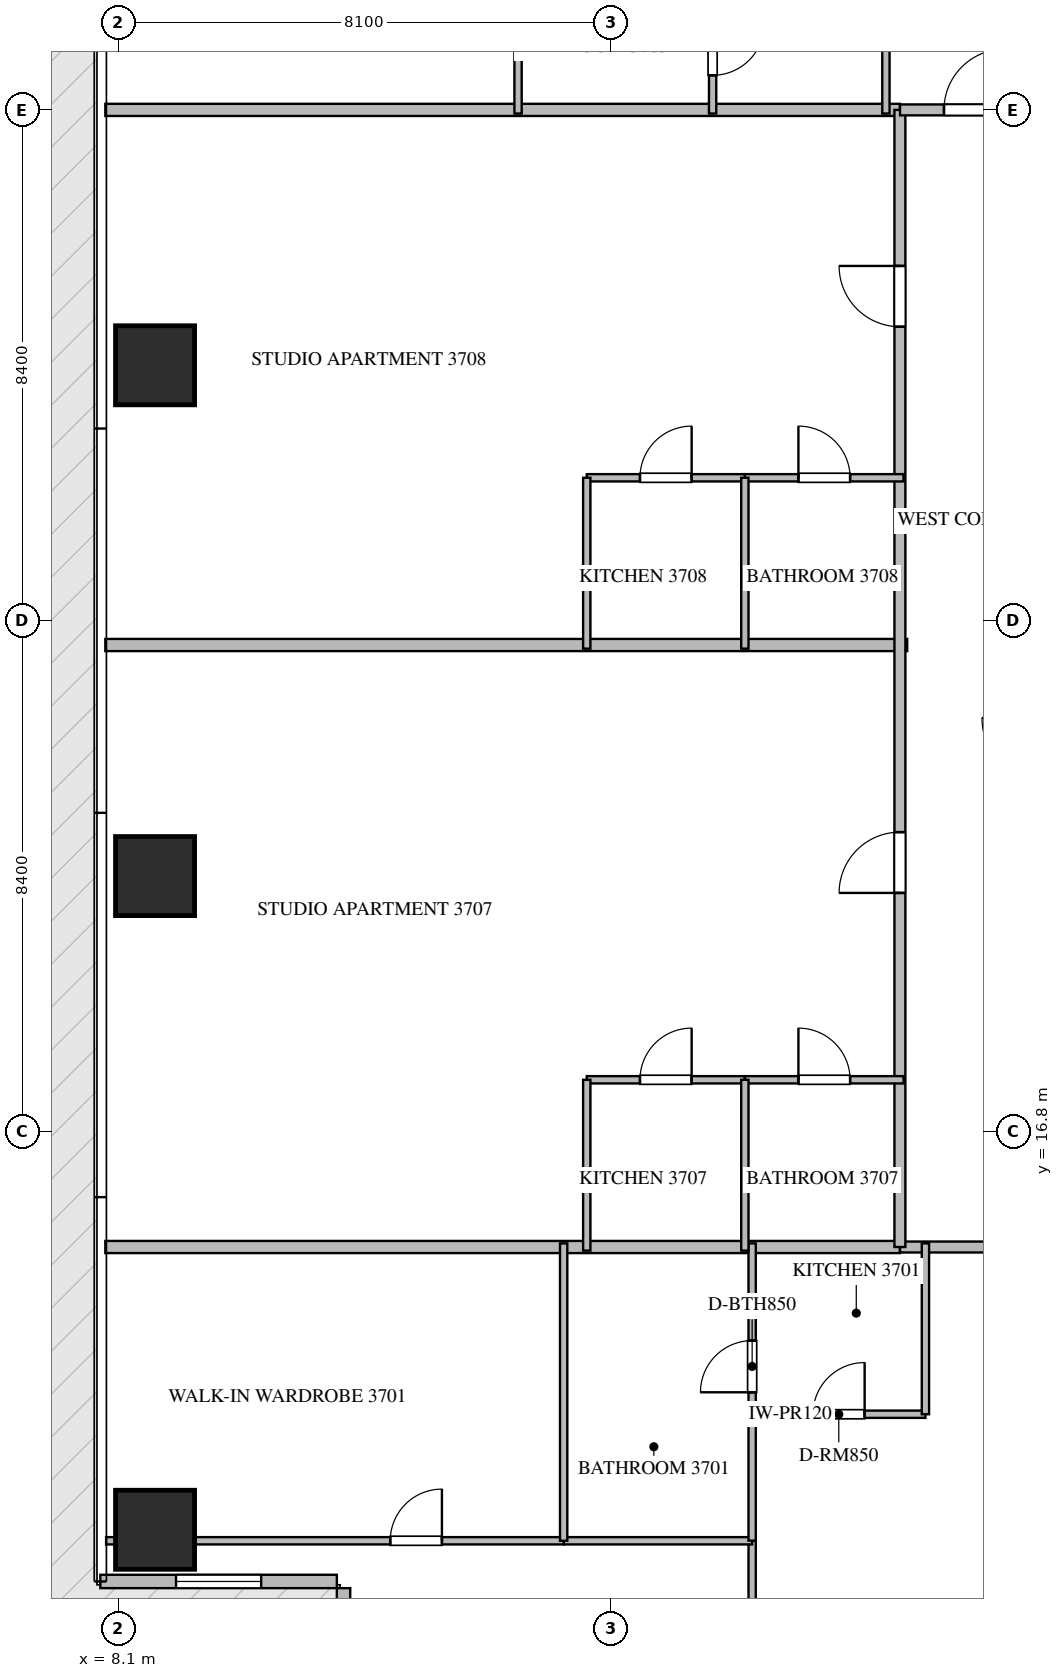
"""IFC4 building model, lengths in metres.
Left out: names, types, materials, properties, quantities, classifications, styles, units other than length and angle.
Written with IfcOpenShell. Run it as: python <this file> out.ifc"""

import sys

from ifc_helpers import new_model, si_unit, direction, frame, frame_2d, origin, origin_2d, place, context, subcontext, project, spatial, rectangle, extrude, source, transform, mapped, element, fill, save


model = new_model("IFC4")
c1 = context("Model", 3, precision=1e-05, world=origin(), true_north=direction((0.0, 1.0)))
c2 = subcontext(c1, "Body", "Model", "MODEL_VIEW")
j1 = project(units=[si_unit("LENGTHUNIT", "METRE"), si_unit("PLANEANGLEUNIT", "RADIAN")], contexts=[c1])
p1 = place(None, origin())
s1 = spatial("IfcSite", under=j1, at=p1, CompositionType="ELEMENT")
p2 = place(p1, origin())
s2 = spatial("IfcBuilding", under=s1, at=p2, CompositionType="ELEMENT")
p3 = place(p2, frame((0.0, 0.0, 150.15)))
s3 = spatial("IfcBuildingStorey", under=s2, at=p3, CompositionType="ELEMENT", Elevation=150.15)
m1 = source(origin(), c2, "Body", "SweptSolid", [
    extrude(rectangle(XDim=1.3, YDim=1.3, at=origin_2d()), origin(), (0.0, 0.0, 1.0), 3.75),
])
for number, where, z_axis, x_axis in (
    (1, (8.7, 10.25, -0.26), (0.0, 0.0, 1.0), (1.0, 0.0, 0.0)),
    (2, (8.7, 21.0, -0.26), (0.0, 0.0, 1.0), (1.0, 0.0, 0.0)),
    (3, (8.7, 29.4, -0.26), (0.0, 0.0, 1.0), (1.0, 0.0, 0.0)),
):
    element("IfcColumn", number, at=place(p3, frame(where, z_axis=z_axis, x_axis=x_axis)), inside=s3, PredefinedType="COLUMN", context=c2, shape_type="MappedRepresentation", body=[
        mapped(m1, transform((0.0, 0.0, 0.0), scale=1.0)),
    ])
p4 = place(p3, frame((7.8, 9.4, 0.0), z_axis=(0.0, 0.0, 1.0), x_axis=(1.0, 0.0, 0.0)))
e4 = element("IfcWall", 4, at=p4, inside=s3, PredefinedType="ELEMENTEDWALL", context=c2, shape_type="SweptSolid", body=[
    extrude(rectangle(XDim=3.89, YDim=0.22, at=frame_2d((1.945, 0.0))), origin(), (0.0, 0.0, 1.0), 3.475),
])
p5 = place(p4, frame((1.245, 0.0, 0.65)))
e5 = element("IfcOpeningElement", 5, at=p5, cuts=e4, PredefinedType="OPENING", context=c2, shape_type="SweptSolid", body=[
    extrude(rectangle(XDim=1.4, YDim=2.05, at=frame_2d((0.7, 1.025))), frame((0.0, 0.12, 0.0), z_axis=(0.0, -1.0, 0.0), x_axis=(1.0, 0.0, 0.0)), (0.0, 0.0, 1.0), 0.24),
])
p6 = place(p3, frame((11.8, 9.29, 0.0), z_axis=(0.0, 0.0, 1.0), x_axis=(0.0, -1.0, 0.0)))
e6 = element("IfcWall", 6, at=p6, inside=s3, PredefinedType="ELEMENTEDWALL", context=c2, shape_type="SweptSolid", body=[
    extrude(rectangle(XDim=3.78, YDim=0.22, at=frame_2d((1.89, 0.0))), origin(), (0.0, 0.0, 1.0), 3.475),
])
p7 = place(p6, frame((1.19, 0.0, 0.65)))
e7 = element("IfcOpeningElement", 7, at=p7, cuts=e6, PredefinedType="OPENING", context=c2, shape_type="SweptSolid", body=[
    extrude(rectangle(XDim=1.4, YDim=2.05, at=frame_2d((0.7, 1.025))), frame((0.0, 0.12, 0.0), z_axis=(0.0, -1.0, 0.0), x_axis=(1.0, 0.0, 0.0)), (0.0, 0.0, 1.0), 0.24),
])
p8 = place(p3, frame((7.882, 24.8, 0.0), z_axis=(0.0, 0.0, 1.0), x_axis=(1.0, 0.0, 0.0)))
e8 = element("IfcWall", 8, at=p8, inside=s3, PredefinedType="PARTITIONING", context=c2, shape_type="SweptSolid", body=[
    extrude(rectangle(XDim=13.188, YDim=0.2, at=frame_2d((6.594, 0.0))), origin(), (0.0, 0.0, 1.0), 3.49),
])
for number, where, z_axis, x_axis in (
    (9, (7.882, 14.9, 0.0), (0.0, 0.0, 1.0), (1.0, 0.0, 0.0)),
    (10, (7.882, 33.6, 0.0), (0.0, 0.0, 1.0), (1.0, 0.0, 0.0)),
):
    element("IfcWall", number, at=place(p3, frame(where, z_axis=z_axis, x_axis=x_axis)), inside=s3, PredefinedType="PARTITIONING", context=c2, shape_type="SweptSolid", body=[
        extrude(rectangle(XDim=13.068, YDim=0.2, at=frame_2d((6.534, 0.0))), origin(), (0.0, 0.0, 1.0), 3.49),
    ])
p9 = place(p3, frame((20.952, 14.9, 0.0), z_axis=(0.0, 0.0, 1.0), x_axis=(1.0, 0.0, 0.0)))
e11 = element("IfcWall", 11, at=p9, inside=s3, PredefinedType="PARTITIONING", context=c2, shape_type="SweptSolid", body=[
    extrude(rectangle(XDim=22.896, YDim=0.18, at=frame_2d((11.448, 0.0))), origin(), (0.0, 0.0, 1.0), 3.49),
])
p10 = place(p9, frame((2.19, 0.0, 0.0)))
e12 = element("IfcOpeningElement", 12, at=p10, cuts=e11, PredefinedType="OPENING", context=c2, shape_type="SweptSolid", body=[
    extrude(rectangle(XDim=1.0, YDim=2.15, at=frame_2d((0.5, 1.075))), frame((0.0, 0.1, 0.0), z_axis=(0.0, -1.0, 0.0), x_axis=(1.0, 0.0, 0.0)), (0.0, 0.0, 1.0), 0.2),
])
p11 = place(p9, frame((5.802, 0.0, 0.0)))
e13 = element("IfcOpeningElement", 13, at=p11, cuts=e11, PredefinedType="OPENING", context=c2, shape_type="SweptSolid", body=[
    extrude(rectangle(XDim=1.0, YDim=2.15, at=frame_2d((0.5, 1.075))), frame((0.0, 0.1, 0.0), z_axis=(0.0, -1.0, 0.0), x_axis=(1.0, 0.0, 0.0)), (0.0, 0.0, 1.0), 0.2),
])
p12 = place(p9, frame((12.196, 0.0, 0.0)))
e14 = element("IfcOpeningElement", 14, at=p12, cuts=e11, PredefinedType="OPENING", context=c2, shape_type="SweptSolid", body=[
    extrude(rectangle(XDim=1.0, YDim=2.15, at=frame_2d((0.5, 1.075))), frame((0.0, 0.1, 0.0), z_axis=(0.0, -1.0, 0.0), x_axis=(1.0, 0.0, 0.0)), (0.0, 0.0, 1.0), 0.2),
])
p13 = place(p9, frame((19.706, 0.0, 0.0)))
e15 = element("IfcOpeningElement", 15, at=p13, cuts=e11, PredefinedType="OPENING", context=c2, shape_type="SweptSolid", body=[
    extrude(rectangle(XDim=1.0, YDim=2.15, at=frame_2d((0.5, 1.075))), frame((0.0, 0.1, 0.0), z_axis=(0.0, -1.0, 0.0), x_axis=(1.0, 0.0, 0.0)), (0.0, 0.0, 1.0), 0.2),
])
p14 = place(p3, frame((20.95, 14.9, 0.0), z_axis=(0.0, 0.0, 1.0), x_axis=(0.0, 1.0, 0.0)))
e16 = element("IfcWall", 16, at=p14, inside=s3, PredefinedType="PARTITIONING", context=c2, shape_type="SweptSolid", body=[
    extrude(rectangle(XDim=18.7, YDim=0.18, at=frame_2d((9.35, 0.0))), origin(), (0.0, 0.0, 1.0), 3.49),
])
p15 = place(p14, frame((5.823, 0.0, 0.0)))
e17 = element("IfcOpeningElement", 17, at=p15, cuts=e16, PredefinedType="OPENING", context=c2, shape_type="SweptSolid", body=[
    extrude(rectangle(XDim=1.0, YDim=2.15, at=frame_2d((0.5, 1.075))), frame((0.0, 0.1, 0.0), z_axis=(0.0, -1.0, 0.0), x_axis=(1.0, 0.0, 0.0)), (0.0, 0.0, 1.0), 0.2),
])
p16 = place(p14, frame((15.134, 0.0, 0.0)))
e18 = element("IfcOpeningElement", 18, at=p16, cuts=e16, PredefinedType="OPENING", context=c2, shape_type="SweptSolid", body=[
    extrude(rectangle(XDim=1.0, YDim=2.15, at=frame_2d((0.5, 1.075))), frame((0.0, 0.1, 0.0), z_axis=(0.0, -1.0, 0.0), x_axis=(1.0, 0.0, 0.0)), (0.0, 0.0, 1.0), 0.2),
])
p17 = place(p3, frame((20.952, 33.6, 0.0), z_axis=(0.0, 0.0, 1.0), x_axis=(1.0, 0.0, 0.0)))
e19 = element("IfcWall", 19, at=p17, inside=s3, PredefinedType="PARTITIONING", context=c2, shape_type="SweptSolid", body=[
    extrude(rectangle(XDim=2.446, YDim=0.18, at=frame_2d((1.223, 0.0))), origin(), (0.0, 0.0, 1.0), 3.49),
])
p18 = place(p17, frame((0.723, 0.0, 0.0)))
e20 = element("IfcOpeningElement", 20, at=p18, cuts=e19, PredefinedType="OPENING", context=c2, shape_type="SweptSolid", body=[
    extrude(rectangle(XDim=1.0, YDim=2.15, at=frame_2d((0.5, 1.075))), frame((0.0, 0.1, 0.0), z_axis=(0.0, -1.0, 0.0), x_axis=(1.0, 0.0, 0.0)), (0.0, 0.0, 1.0), 0.2),
])
p19 = place(p3, frame((18.52, 12.15, 0.0), z_axis=(0.0, 0.0, 1.0), x_axis=(1.0, 0.0, 0.0)))
e21 = element("IfcWall", 21, at=p19, inside=s3, PredefinedType="PARTITIONING", context=c2, shape_type="SweptSolid", body=[
    extrude(rectangle(XDim=2.85, YDim=0.12, at=frame_2d((1.425, 0.0))), origin(), (0.0, 0.0, 1.0), 3.49),
])
p20 = place(p19, frame((1.0, 0.0, 0.0)))
e22 = element("IfcOpeningElement", 22, at=p20, cuts=e21, PredefinedType="OPENING", context=c2, shape_type="SweptSolid", body=[
    extrude(rectangle(XDim=0.85, YDim=2.1, at=frame_2d((0.425, 1.05))), frame((0.0, 0.07, 0.0), z_axis=(0.0, -1.0, 0.0), x_axis=(1.0, 0.0, 0.0)), (0.0, 0.0, 1.0), 0.14),
])
p21 = place(p3, frame((21.37, 12.15, 0.0), z_axis=(0.0, 0.0, 1.0), x_axis=(0.0, 1.0, 0.0)))
e23 = element("IfcWall", 23, at=p21, inside=s3, PredefinedType="PARTITIONING", context=c2, shape_type="SweptSolid", body=[
    extrude(rectangle(XDim=2.81, YDim=0.12, at=frame_2d((1.405, 0.0))), origin(), (0.0, 0.0, 1.0), 3.49),
])
p22 = place(p3, frame((18.52, 1.495, 0.0), z_axis=(0.0, 0.0, 1.0), x_axis=(0.0, 1.0, 0.0)))
e24 = element("IfcWall", 24, at=p22, inside=s3, PredefinedType="PARTITIONING", context=c2, shape_type="SweptSolid", body=[
    extrude(rectangle(XDim=8.574, YDim=0.12, at=frame_2d((4.287, 0.0))), origin(), (0.0, 0.0, 1.0), 3.49),
])
p23 = place(p22, frame((4.221, 0.0, 0.0)))
e25 = element("IfcOpeningElement", 25, at=p23, cuts=e24, PredefinedType="OPENING", context=c2, shape_type="SweptSolid", body=[
    extrude(rectangle(XDim=0.9, YDim=2.1, at=frame_2d((0.45, 1.05))), frame((0.0, 0.07, 0.0), z_axis=(0.0, -1.0, 0.0), x_axis=(1.0, 0.0, 0.0)), (0.0, 0.0, 1.0), 0.14),
])
p24 = place(p3, frame((7.895, 10.069, 0.0), z_axis=(0.0, 0.0, 1.0), x_axis=(1.0, 0.0, 0.0)))
e26 = element("IfcWall", 26, at=p24, inside=s3, PredefinedType="PARTITIONING", context=c2, shape_type="SweptSolid", body=[
    extrude(rectangle(XDim=7.525, YDim=0.12, at=frame_2d((3.762, 0.0))), origin(), (0.0, 0.0, 1.0), 2.972),
])
p25 = place(p24, frame((4.673, 0.0, 0.0)))
e27 = element("IfcOpeningElement", 27, at=p25, cuts=e26, PredefinedType="OPENING", context=c2, shape_type="SweptSolid", body=[
    extrude(rectangle(XDim=0.85, YDim=2.1, at=frame_2d((0.425, 1.05))), frame((0.0, 0.07, 0.0), z_axis=(0.0, -1.0, 0.0), x_axis=(1.0, 0.0, 0.0)), (0.0, 0.0, 1.0), 0.14),
])
p26 = place(p3, frame((15.422, 10.069, 0.0), z_axis=(0.0, 0.0, 1.0), x_axis=(1.0, 0.0, 0.0)))
e28 = element("IfcWall", 28, at=p26, inside=s3, PredefinedType="PARTITIONING", context=c2, shape_type="SweptSolid", body=[
    extrude(rectangle(XDim=3.098, YDim=0.12, at=frame_2d((1.549, 0.0))), origin(), (0.0, 0.0, 1.0), 2.972),
])
p27 = place(p3, frame((15.42, 10.069, 0.0), z_axis=(0.0, 0.0, 1.0), x_axis=(0.0, 1.0, 0.0)))
e29 = element("IfcWall", 29, at=p27, inside=s3, PredefinedType="PARTITIONING", context=c2, shape_type="SweptSolid", body=[
    extrude(rectangle(XDim=4.891, YDim=0.12, at=frame_2d((2.445, 0.0))), origin(), (0.0, 0.0, 1.0), 3.49),
])
p28 = place(p3, frame((18.52, 10.071, 0.0), z_axis=(0.0, 0.0, 1.0), x_axis=(0.0, 1.0, 0.0)))
e30 = element("IfcWall", 30, at=p28, inside=s3, PredefinedType="PARTITIONING", context=c2, shape_type="SweptSolid", body=[
    extrude(rectangle(XDim=4.889, YDim=0.12, at=frame_2d((2.444, 0.0))), origin(), (0.0, 0.0, 1.0), 3.49),
])
p29 = place(p28, frame((2.44, 0.0, 0.0)))
e31 = element("IfcOpeningElement", 31, at=p29, cuts=e30, PredefinedType="OPENING", context=c2, shape_type="SweptSolid", body=[
    extrude(rectangle(XDim=0.85, YDim=2.1, at=frame_2d((0.425, 1.05))), frame((0.0, 0.07, 0.0), z_axis=(0.0, -1.0, 0.0), x_axis=(1.0, 0.0, 0.0)), (0.0, 0.0, 1.0), 0.14),
])
p30 = place(p3, frame((20.72, 36.35, 0.0), z_axis=(0.0, 0.0, 1.0), x_axis=(0.0, -1.0, 0.0)))
e32 = element("IfcWall", 32, at=p30, inside=s3, PredefinedType="PARTITIONING", context=c2, shape_type="SweptSolid", body=[
    extrude(rectangle(XDim=2.81, YDim=0.12, at=frame_2d((1.405, 0.0))), origin(), (0.0, 0.0, 1.0), 3.49),
])
p31 = place(p3, frame((14.67, 35.65, 0.0), z_axis=(0.0, 0.0, 1.0), x_axis=(0.0, -1.0, 0.0)))
e33 = element("IfcWall", 33, at=p31, inside=s3, PredefinedType="PARTITIONING", context=c2, shape_type="SweptSolid", body=[
    extrude(rectangle(XDim=2.11, YDim=0.12, at=frame_2d((1.055, 0.0))), origin(), (0.0, 0.0, 1.0), 3.49),
])
p32 = place(p3, frame((17.87, 35.648, 0.0), z_axis=(0.0, 0.0, 1.0), x_axis=(0.0, -1.0, 0.0)))
e34 = element("IfcWall", 34, at=p32, inside=s3, PredefinedType="PARTITIONING", context=c2, shape_type="SweptSolid", body=[
    extrude(rectangle(XDim=2.108, YDim=0.12, at=frame_2d((1.054, 0.0))), origin(), (0.0, 0.0, 1.0), 3.49),
])
p33 = place(p32, frame((0.629, 0.0, 0.0)))
e35 = element("IfcOpeningElement", 35, at=p33, cuts=e34, PredefinedType="OPENING", context=c2, shape_type="SweptSolid", body=[
    extrude(rectangle(XDim=0.85, YDim=2.1, at=frame_2d((0.425, 1.05))), frame((0.0, 0.07, 0.0), z_axis=(0.0, -1.0, 0.0), x_axis=(1.0, 0.0, 0.0)), (0.0, 0.0, 1.0), 0.14),
])
p34 = place(p3, frame((15.8, 17.65, 0.0), z_axis=(0.0, 0.0, 1.0), x_axis=(1.0, 0.0, 0.0)))
e36 = element("IfcWall", 36, at=p34, inside=s3, PredefinedType="PARTITIONING", context=c2, shape_type="SweptSolid", body=[
    extrude(rectangle(XDim=2.6, YDim=0.12, at=frame_2d((1.3, 0.0))), origin(), (0.0, 0.0, 1.0), 3.49),
])
p35 = place(p34, frame((0.875, 0.0, 0.0)))
e37 = element("IfcOpeningElement", 37, at=p35, cuts=e36, PredefinedType="OPENING", context=c2, shape_type="SweptSolid", body=[
    extrude(rectangle(XDim=0.85, YDim=2.1, at=frame_2d((0.425, 1.05))), frame((0.0, 0.07, 0.0), z_axis=(0.0, -1.0, 0.0), x_axis=(1.0, 0.0, 0.0)), (0.0, 0.0, 1.0), 0.14),
])
p36 = place(p3, frame((18.402, 17.65, 0.0), z_axis=(0.0, 0.0, 1.0), x_axis=(1.0, 0.0, 0.0)))
e38 = element("IfcWall", 38, at=p36, inside=s3, PredefinedType="PARTITIONING", context=c2, shape_type="SweptSolid", body=[
    extrude(rectangle(XDim=2.608, YDim=0.12, at=frame_2d((1.304, 0.0))), origin(), (0.0, 0.0, 1.0), 3.49),
])
p37 = place(p36, frame((0.879, 0.0, 0.0)))
e39 = element("IfcOpeningElement", 39, at=p37, cuts=e38, PredefinedType="OPENING", context=c2, shape_type="SweptSolid", body=[
    extrude(rectangle(XDim=0.85, YDim=2.1, at=frame_2d((0.425, 1.05))), frame((0.0, 0.07, 0.0), z_axis=(0.0, -1.0, 0.0), x_axis=(1.0, 0.0, 0.0)), (0.0, 0.0, 1.0), 0.14),
])
for number, where, z_axis, x_axis in (
    (40, (18.4, 14.84, 0.0), (0.0, 0.0, 1.0), (0.0, 1.0, 0.0)),
    (41, (15.8, 14.84, 0.0), (0.0, 0.0, 1.0), (0.0, 1.0, 0.0)),
):
    element("IfcWall", number, at=place(p3, frame(where, z_axis=z_axis, x_axis=x_axis)), inside=s3, PredefinedType="PARTITIONING", context=c2, shape_type="SweptSolid", body=[
        extrude(rectangle(XDim=2.81, YDim=0.12, at=frame_2d((1.405, 0.0))), origin(), (0.0, 0.0, 1.0), 3.49),
    ])
p38 = place(p3, frame((15.8, 27.55, 0.0), z_axis=(0.0, 0.0, 1.0), x_axis=(1.0, 0.0, 0.0)))
e42 = element("IfcWall", 42, at=p38, inside=s3, PredefinedType="PARTITIONING", context=c2, shape_type="SweptSolid", body=[
    extrude(rectangle(XDim=2.6, YDim=0.12, at=frame_2d((1.3, 0.0))), origin(), (0.0, 0.0, 1.0), 3.49),
])
p39 = place(p38, frame((0.875, 0.0, 0.0)))
e43 = element("IfcOpeningElement", 43, at=p39, cuts=e42, PredefinedType="OPENING", context=c2, shape_type="SweptSolid", body=[
    extrude(rectangle(XDim=0.85, YDim=2.1, at=frame_2d((0.425, 1.05))), frame((0.0, 0.07, 0.0), z_axis=(0.0, -1.0, 0.0), x_axis=(1.0, 0.0, 0.0)), (0.0, 0.0, 1.0), 0.14),
])
p40 = place(p3, frame((18.402, 27.55, 0.0), z_axis=(0.0, 0.0, 1.0), x_axis=(1.0, 0.0, 0.0)))
e44 = element("IfcWall", 44, at=p40, inside=s3, PredefinedType="PARTITIONING", context=c2, shape_type="SweptSolid", body=[
    extrude(rectangle(XDim=2.608, YDim=0.12, at=frame_2d((1.304, 0.0))), origin(), (0.0, 0.0, 1.0), 3.49),
])
p41 = place(p40, frame((0.879, 0.0, 0.0)))
e45 = element("IfcOpeningElement", 45, at=p41, cuts=e44, PredefinedType="OPENING", context=c2, shape_type="SweptSolid", body=[
    extrude(rectangle(XDim=0.85, YDim=2.1, at=frame_2d((0.425, 1.05))), frame((0.0, 0.07, 0.0), z_axis=(0.0, -1.0, 0.0), x_axis=(1.0, 0.0, 0.0)), (0.0, 0.0, 1.0), 0.14),
])
for number, where, z_axis, x_axis in (
    (46, (18.4, 24.74, 0.0), (0.0, 0.0, 1.0), (0.0, 1.0, 0.0)),
    (47, (15.8, 24.74, 0.0), (0.0, 0.0, 1.0), (0.0, 1.0, 0.0)),
):
    element("IfcWall", number, at=place(p3, frame(where, z_axis=z_axis, x_axis=x_axis)), inside=s3, PredefinedType="PARTITIONING", context=c2, shape_type="SweptSolid", body=[
        extrude(rectangle(XDim=2.81, YDim=0.12, at=frame_2d((1.405, 0.0))), origin(), (0.0, 0.0, 1.0), 3.49),
    ])
m2 = source(origin(), c2, "Body", "SweptSolid", [
    extrude(rectangle(XDim=1.4, YDim=2.05, at=frame_2d((0.7, 1.025))), frame((0.0, 0.03, 0.0), z_axis=(0.0, -1.0, 0.0), x_axis=(1.0, 0.0, 0.0)), (0.0, 0.0, 1.0), 0.06),
])
p42 = place(p5, origin())
e48 = element("IfcWindow", 48, at=p42, inside=s3, PartitioningType="SINGLE_PANEL", PredefinedType="WINDOW", context=c2, shape_type="MappedRepresentation", body=[
    mapped(m2, transform((0.0, 0.0, 0.0), scale=1.0)),
])
fill(e5, e48)
m3 = source(origin(), c2, "Body", "SweptSolid", [
    extrude(rectangle(XDim=1.0, YDim=2.15, at=frame_2d((0.5, 1.075))), frame((0.0, 0.025, 0.0), z_axis=(0.0, -1.0, 0.0), x_axis=(1.0, 0.0, 0.0)), (0.0, 0.0, 1.0), 0.05),
])
p43 = place(p15, origin())
e49 = element("IfcDoor", 49, at=p43, inside=s3, OperationType="SINGLE_SWING_LEFT", PredefinedType="DOOR", context=c2, shape_type="MappedRepresentation", body=[
    mapped(m3, transform((0.0, 0.0, 0.0), scale=1.0)),
])
fill(e17, e49)
p44 = place(p16, origin())
e50 = element("IfcDoor", 50, at=p44, inside=s3, OperationType="SINGLE_SWING_RIGHT", PredefinedType="DOOR", context=c2, shape_type="MappedRepresentation", body=[
    mapped(m3, transform((0.0, 0.0, 0.0), scale=1.0)),
])
fill(e18, e50)
p45 = place(p18, origin())
e51 = element("IfcDoor", 51, at=p45, inside=s3, OperationType="SINGLE_SWING_RIGHT", PredefinedType="DOOR", context=c2, shape_type="MappedRepresentation", body=[
    mapped(m3, transform((0.0, 0.0, 0.0), scale=1.0)),
])
fill(e20, e51)
m4 = source(origin(), c2, "Body", "SweptSolid", [
    extrude(rectangle(XDim=0.85, YDim=2.1, at=frame_2d((0.425, 1.05))), frame((0.0, 0.025, 0.0), z_axis=(0.0, -1.0, 0.0), x_axis=(1.0, 0.0, 0.0)), (0.0, 0.0, 1.0), 0.05),
])
p46 = place(p20, origin())
e52 = element("IfcDoor", 52, at=p46, inside=s3, OperationType="SINGLE_SWING_RIGHT", PredefinedType="DOOR", context=c2, shape_type="MappedRepresentation", body=[
    mapped(m4, transform((0.0, 0.0, 0.0), scale=1.0)),
])
fill(e22, e52)
p47 = place(p25, origin())
e53 = element("IfcDoor", 53, at=p47, inside=s3, OperationType="SINGLE_SWING_RIGHT", PredefinedType="DOOR", context=c2, shape_type="MappedRepresentation", body=[
    mapped(m4, transform((0.0, 0.0, 0.0), scale=1.0)),
])
fill(e27, e53)
p48 = place(p29, origin())
e54 = element("IfcDoor", 54, at=p48, inside=s3, OperationType="SINGLE_SWING_LEFT", PredefinedType="DOOR", context=c2, shape_type="MappedRepresentation", body=[
    mapped(m4, transform((0.0, 0.0, 0.0), scale=1.0)),
])
fill(e31, e54)
p49 = place(p33, origin())
e55 = element("IfcDoor", 55, at=p49, inside=s3, OperationType="SINGLE_SWING_LEFT", PredefinedType="DOOR", context=c2, shape_type="MappedRepresentation", body=[
    mapped(m4, transform((0.0, 0.0, 0.0), scale=1.0)),
])
fill(e35, e55)
p50 = place(p35, origin())
e56 = element("IfcDoor", 56, at=p50, inside=s3, OperationType="SINGLE_SWING_RIGHT", PredefinedType="DOOR", context=c2, shape_type="MappedRepresentation", body=[
    mapped(m4, transform((0.0, 0.0, 0.0), scale=1.0)),
])
fill(e37, e56)
p51 = place(p37, origin())
e57 = element("IfcDoor", 57, at=p51, inside=s3, OperationType="SINGLE_SWING_LEFT", PredefinedType="DOOR", context=c2, shape_type="MappedRepresentation", body=[
    mapped(m4, transform((0.0, 0.0, 0.0), scale=1.0)),
])
fill(e39, e57)
p52 = place(p39, origin())
e58 = element("IfcDoor", 58, at=p52, inside=s3, OperationType="SINGLE_SWING_RIGHT", PredefinedType="DOOR", context=c2, shape_type="MappedRepresentation", body=[
    mapped(m4, transform((0.0, 0.0, 0.0), scale=1.0)),
])
fill(e43, e58)
p53 = place(p41, origin())
e59 = element("IfcDoor", 59, at=p53, inside=s3, OperationType="SINGLE_SWING_LEFT", PredefinedType="DOOR", context=c2, shape_type="MappedRepresentation", body=[
    mapped(m4, transform((0.0, 0.0, 0.0), scale=1.0)),
])
fill(e45, e59)
save(model, sys.argv[1])
